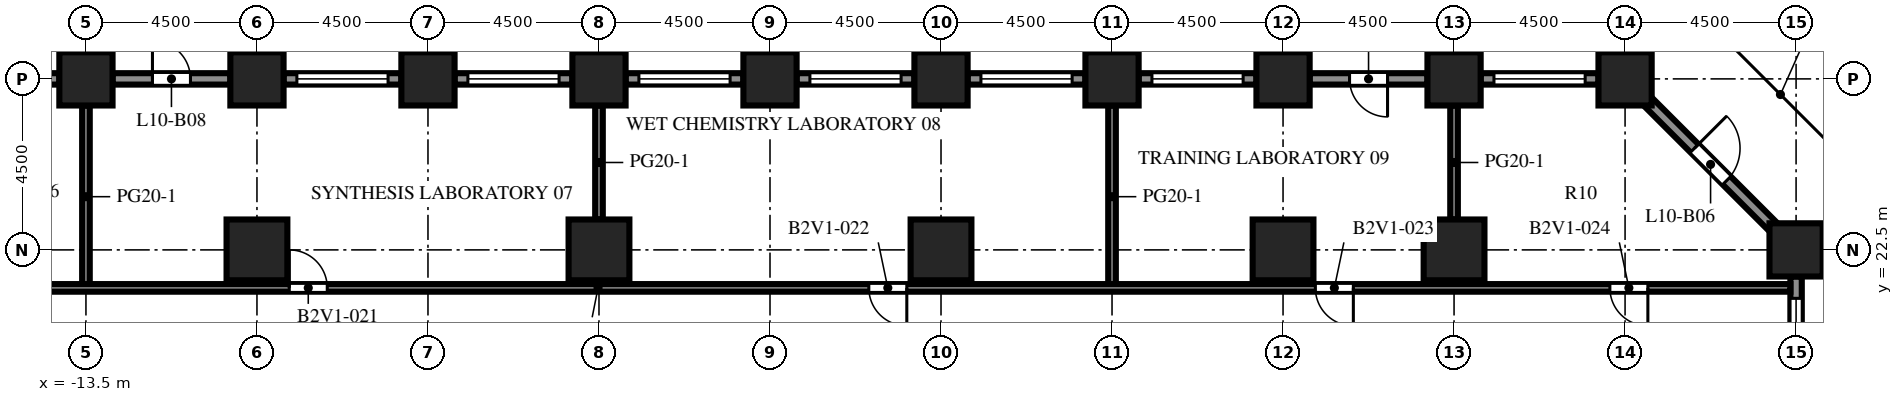
"""IFC4 building model, lengths in metres.
Left out: names, types, materials, properties, quantities, classifications, styles, units other than length and angle.
Written with IfcOpenShell. Run it as: python <this file> out.ifc"""

import sys

from ifc_helpers import new_model, si_unit, direction, frame, frame_2d, origin, origin_2d, place, context, subcontext, project, spatial, rectangle, extrude, element, fill, save


model = new_model("IFC4")
c1 = context("Model", 3, precision=1e-05, world=origin(), true_north=direction((0.0, 1.0)))
c2 = subcontext(c1, "Body", "Model", "MODEL_VIEW")
j1 = project(units=[si_unit("LENGTHUNIT", "METRE"), si_unit("PLANEANGLEUNIT", "RADIAN")], contexts=[c1])
p1 = place(None, origin())
s1 = spatial("IfcSite", under=j1, at=p1, CompositionType="ELEMENT")
p2 = place(p1, origin())
s2 = spatial("IfcBuilding", under=s1, at=p2, CompositionType="ELEMENT")
p3 = place(p2, frame((0.0, 0.0, 46.0)))
s3 = spatial("IfcBuildingStorey", under=s2, at=p3, CompositionType="ELEMENT", Elevation=46.0)
for number, where, z_axis, x_axis in (
    (1, (-13.5, 27.0, 0.0), (0.0, 0.0, 1.0), (1.0, 0.0, 0.0)),
    (2, (-9.0, 27.0, 0.0), (0.0, 0.0, 1.0), (1.0, 0.0, 0.0)),
    (3, (-4.5, 27.0, 0.0), (0.0, 0.0, 1.0), (1.0, 0.0, 0.0)),
    (4, (0.0, 27.0, 0.0), (0.0, 0.0, 1.0), (1.0, 0.0, 0.0)),
    (5, (4.5, 27.0, 0.0), (0.0, 0.0, 1.0), (1.0, 0.0, 0.0)),
    (6, (9.0, 27.0, 0.0), (0.0, 0.0, 1.0), (1.0, 0.0, 0.0)),
    (7, (13.5, 27.0, 0.0), (0.0, 0.0, 1.0), (1.0, 0.0, 0.0)),
    (8, (18.0, 27.0, 0.0), (0.0, 0.0, 1.0), (1.0, 0.0, 0.0)),
    (9, (22.5, 27.0, 0.0), (0.0, 0.0, 1.0), (1.0, 0.0, 0.0)),
    (10, (27.0, 27.0, 0.0), (0.0, 0.0, 1.0), (1.0, 0.0, 0.0)),
    (11, (31.5, 22.5, 0.0), (0.0, 0.0, 1.0), (1.0, 0.0, 0.0)),
):
    element("IfcColumn", number, at=place(p3, frame(where, z_axis=z_axis, x_axis=x_axis)), inside=s3, PredefinedType="COLUMN", context=c2, shape_type="SweptSolid", body=[
        extrude(rectangle(XDim=1.4, YDim=1.4, at=origin_2d()), origin(), (0.0, 0.0, 1.0), 4.1),
    ])
for number, where, z_axis, x_axis in (
    (12, (-9.0, 22.5, 0.0), (0.0, 0.0, 1.0), (1.0, 0.0, 0.0)),
    (13, (0.0, 22.5, 0.0), (0.0, 0.0, 1.0), (1.0, 0.0, 0.0)),
    (14, (9.0, 22.5, 0.0), (0.0, 0.0, 1.0), (1.0, 0.0, 0.0)),
    (15, (18.0, 22.5, 0.0), (0.0, 0.0, 1.0), (1.0, 0.0, 0.0)),
    (16, (22.5, 22.5, 0.0), (0.0, 0.0, 1.0), (1.0, 0.0, 0.0)),
):
    element("IfcColumn", number, at=place(p3, frame(where, z_axis=z_axis, x_axis=x_axis)), inside=s3, PredefinedType="COLUMN", context=c2, shape_type="SweptSolid", body=[
        extrude(rectangle(XDim=1.6, YDim=1.6, at=origin_2d()), origin(), (0.0, 0.0, 1.0), 4.1),
    ])
p4 = place(p3, frame((31.5, 21.8, 0.0), z_axis=(0.0, 0.0, 1.0), x_axis=(0.0, -1.0, 0.0)))
e17 = element("IfcWall", 17, at=p4, inside=s3, PredefinedType="SOLIDWALL", context=c2, shape_type="SweptSolid", body=[
    extrude(rectangle(XDim=3.1, YDim=0.3, at=frame_2d((1.55, 0.0))), origin(), (0.0, 0.0, 1.0), 2.75),
])
p5 = place(p4, frame((0.575, 0.0, 0.8)))
e18 = element("IfcOpeningElement", 18, at=p5, cuts=e17, PredefinedType="OPENING", context=c2, shape_type="SweptSolid", body=[
    extrude(rectangle(XDim=2.4, YDim=1.7, at=frame_2d((1.2, 0.85))), frame((0.0, 0.16, 0.0), z_axis=(0.0, -1.0, 0.0), x_axis=(1.0, 0.0, 0.0)), (0.0, 0.0, 1.0), 0.32),
])
p6 = place(p3, frame((27.594, 26.406, 0.0), z_axis=(0.0, 0.0, 1.0), x_axis=(0.707106781187, -0.707106781187, 0.0)))
e19 = element("IfcWall", 19, at=p6, inside=s3, PredefinedType="SOLIDWALL", context=c2, shape_type="SweptSolid", body=[
    extrude(rectangle(XDim=4.684, YDim=0.3, at=frame_2d((2.342, 0.0))), origin(), (0.0, 0.0, 1.0), 2.75),
])
p7 = place(p6, frame((1.742, 0.0, 0.0)))
e20 = element("IfcOpeningElement", 20, at=p7, cuts=e19, PredefinedType="OPENING", context=c2, shape_type="SweptSolid", body=[
    extrude(rectangle(XDim=1.2, YDim=2.2, at=frame_2d((0.6, 1.1))), frame((0.0, 0.16, 0.0), z_axis=(0.0, -1.0, 0.0), x_axis=(1.0, 0.0, 0.0)), (0.0, 0.0, 1.0), 0.32),
])
p8 = place(p3, frame((23.2, 27.0, 0.0), z_axis=(0.0, 0.0, 1.0), x_axis=(1.0, 0.0, 0.0)))
e21 = element("IfcWall", 21, at=p8, inside=s3, PredefinedType="SOLIDWALL", context=c2, shape_type="SweptSolid", body=[
    extrude(rectangle(XDim=3.1, YDim=0.3, at=frame_2d((1.55, 0.0))), origin(), (0.0, 0.0, 1.0), 2.75),
])
p9 = place(p8, frame((0.35, 0.0, 0.8)))
e22 = element("IfcOpeningElement", 22, at=p9, cuts=e21, PredefinedType="OPENING", context=c2, shape_type="SweptSolid", body=[
    extrude(rectangle(XDim=2.4, YDim=1.7, at=frame_2d((1.2, 0.85))), frame((0.0, 0.16, 0.0), z_axis=(0.0, -1.0, 0.0), x_axis=(1.0, 0.0, 0.0)), (0.0, 0.0, 1.0), 0.32),
])
p10 = place(p3, frame((18.7, 27.0, 0.0), z_axis=(0.0, 0.0, 1.0), x_axis=(1.0, 0.0, 0.0)))
e23 = element("IfcWall", 23, at=p10, inside=s3, PredefinedType="SOLIDWALL", context=c2, shape_type="SweptSolid", body=[
    extrude(rectangle(XDim=3.1, YDim=0.3, at=frame_2d((1.55, 0.0))), origin(), (0.0, 0.0, 1.0), 2.75),
])
p11 = place(p10, frame((1.05, 0.0, 0.0)))
e24 = element("IfcOpeningElement", 24, at=p11, cuts=e23, PredefinedType="OPENING", context=c2, shape_type="SweptSolid", body=[
    extrude(rectangle(XDim=1.0, YDim=2.2, at=frame_2d((0.5, 1.1))), frame((0.0, 0.16, 0.0), z_axis=(0.0, -1.0, 0.0), x_axis=(1.0, 0.0, 0.0)), (0.0, 0.0, 1.0), 0.32),
])
p12 = place(p3, frame((14.2, 27.0, 0.0), z_axis=(0.0, 0.0, 1.0), x_axis=(1.0, 0.0, 0.0)))
e25 = element("IfcWall", 25, at=p12, inside=s3, PredefinedType="SOLIDWALL", context=c2, shape_type="SweptSolid", body=[
    extrude(rectangle(XDim=3.1, YDim=0.3, at=frame_2d((1.55, 0.0))), origin(), (0.0, 0.0, 1.0), 2.75),
])
p13 = place(p12, frame((0.35, 0.0, 0.8)))
e26 = element("IfcOpeningElement", 26, at=p13, cuts=e25, PredefinedType="OPENING", context=c2, shape_type="SweptSolid", body=[
    extrude(rectangle(XDim=2.4, YDim=1.7, at=frame_2d((1.2, 0.85))), frame((0.0, 0.16, 0.0), z_axis=(0.0, -1.0, 0.0), x_axis=(1.0, 0.0, 0.0)), (0.0, 0.0, 1.0), 0.32),
])
p14 = place(p3, frame((9.7, 27.0, 0.0), z_axis=(0.0, 0.0, 1.0), x_axis=(1.0, 0.0, 0.0)))
e27 = element("IfcWall", 27, at=p14, inside=s3, PredefinedType="SOLIDWALL", context=c2, shape_type="SweptSolid", body=[
    extrude(rectangle(XDim=3.1, YDim=0.3, at=frame_2d((1.55, 0.0))), origin(), (0.0, 0.0, 1.0), 2.75),
])
p15 = place(p14, frame((0.35, 0.0, 0.8)))
e28 = element("IfcOpeningElement", 28, at=p15, cuts=e27, PredefinedType="OPENING", context=c2, shape_type="SweptSolid", body=[
    extrude(rectangle(XDim=2.4, YDim=1.7, at=frame_2d((1.2, 0.85))), frame((0.0, 0.16, 0.0), z_axis=(0.0, -1.0, 0.0), x_axis=(1.0, 0.0, 0.0)), (0.0, 0.0, 1.0), 0.32),
])
p16 = place(p3, frame((5.2, 27.0, 0.0), z_axis=(0.0, 0.0, 1.0), x_axis=(1.0, 0.0, 0.0)))
e29 = element("IfcWall", 29, at=p16, inside=s3, PredefinedType="SOLIDWALL", context=c2, shape_type="SweptSolid", body=[
    extrude(rectangle(XDim=3.1, YDim=0.3, at=frame_2d((1.55, 0.0))), origin(), (0.0, 0.0, 1.0), 2.75),
])
p17 = place(p16, frame((0.35, 0.0, 0.8)))
e30 = element("IfcOpeningElement", 30, at=p17, cuts=e29, PredefinedType="OPENING", context=c2, shape_type="SweptSolid", body=[
    extrude(rectangle(XDim=2.4, YDim=1.7, at=frame_2d((1.2, 0.85))), frame((0.0, 0.16, 0.0), z_axis=(0.0, -1.0, 0.0), x_axis=(1.0, 0.0, 0.0)), (0.0, 0.0, 1.0), 0.32),
])
p18 = place(p3, frame((0.7, 27.0, 0.0), z_axis=(0.0, 0.0, 1.0), x_axis=(1.0, 0.0, 0.0)))
e31 = element("IfcWall", 31, at=p18, inside=s3, PredefinedType="SOLIDWALL", context=c2, shape_type="SweptSolid", body=[
    extrude(rectangle(XDim=3.1, YDim=0.3, at=frame_2d((1.55, 0.0))), origin(), (0.0, 0.0, 1.0), 2.75),
])
p19 = place(p18, frame((0.35, 0.0, 0.8)))
e32 = element("IfcOpeningElement", 32, at=p19, cuts=e31, PredefinedType="OPENING", context=c2, shape_type="SweptSolid", body=[
    extrude(rectangle(XDim=2.4, YDim=1.7, at=frame_2d((1.2, 0.85))), frame((0.0, 0.16, 0.0), z_axis=(0.0, -1.0, 0.0), x_axis=(1.0, 0.0, 0.0)), (0.0, 0.0, 1.0), 0.32),
])
p20 = place(p3, frame((-3.8, 27.0, 0.0), z_axis=(0.0, 0.0, 1.0), x_axis=(1.0, 0.0, 0.0)))
e33 = element("IfcWall", 33, at=p20, inside=s3, PredefinedType="SOLIDWALL", context=c2, shape_type="SweptSolid", body=[
    extrude(rectangle(XDim=3.1, YDim=0.3, at=frame_2d((1.55, 0.0))), origin(), (0.0, 0.0, 1.0), 2.75),
])
p21 = place(p20, frame((0.35, 0.0, 0.8)))
e34 = element("IfcOpeningElement", 34, at=p21, cuts=e33, PredefinedType="OPENING", context=c2, shape_type="SweptSolid", body=[
    extrude(rectangle(XDim=2.4, YDim=1.7, at=frame_2d((1.2, 0.85))), frame((0.0, 0.16, 0.0), z_axis=(0.0, -1.0, 0.0), x_axis=(1.0, 0.0, 0.0)), (0.0, 0.0, 1.0), 0.32),
])
p22 = place(p3, frame((-8.3, 27.0, 0.0), z_axis=(0.0, 0.0, 1.0), x_axis=(1.0, 0.0, 0.0)))
e35 = element("IfcWall", 35, at=p22, inside=s3, PredefinedType="SOLIDWALL", context=c2, shape_type="SweptSolid", body=[
    extrude(rectangle(XDim=3.1, YDim=0.3, at=frame_2d((1.55, 0.0))), origin(), (0.0, 0.0, 1.0), 2.75),
])
p23 = place(p22, frame((0.35, 0.0, 0.8)))
e36 = element("IfcOpeningElement", 36, at=p23, cuts=e35, PredefinedType="OPENING", context=c2, shape_type="SweptSolid", body=[
    extrude(rectangle(XDim=2.4, YDim=1.7, at=frame_2d((1.2, 0.85))), frame((0.0, 0.16, 0.0), z_axis=(0.0, -1.0, 0.0), x_axis=(1.0, 0.0, 0.0)), (0.0, 0.0, 1.0), 0.32),
])
p24 = place(p3, frame((-12.8, 27.0, 0.0), z_axis=(0.0, 0.0, 1.0), x_axis=(1.0, 0.0, 0.0)))
e37 = element("IfcWall", 37, at=p24, inside=s3, PredefinedType="SOLIDWALL", context=c2, shape_type="SweptSolid", body=[
    extrude(rectangle(XDim=3.1, YDim=0.3, at=frame_2d((1.55, 0.0))), origin(), (0.0, 0.0, 1.0), 2.75),
])
p25 = place(p24, frame((1.05, 0.0, 0.0)))
e38 = element("IfcOpeningElement", 38, at=p25, cuts=e37, PredefinedType="OPENING", context=c2, shape_type="SweptSolid", body=[
    extrude(rectangle(XDim=1.0, YDim=2.2, at=frame_2d((0.5, 1.1))), frame((0.0, 0.16, 0.0), z_axis=(0.0, -1.0, 0.0), x_axis=(1.0, 0.0, 0.0)), (0.0, 0.0, 1.0), 0.32),
])
p26 = place(p3, frame((-17.3, 27.0, 0.0), z_axis=(0.0, 0.0, 1.0), x_axis=(1.0, 0.0, 0.0)))
e39 = element("IfcWall", 39, at=p26, inside=s3, PredefinedType="SOLIDWALL", context=c2, shape_type="SweptSolid", body=[
    extrude(rectangle(XDim=3.1, YDim=0.3, at=frame_2d((1.55, 0.0))), origin(), (0.0, 0.0, 1.0), 2.75),
])
p27 = place(p26, frame((0.35, 0.0, 0.8)))
e40 = element("IfcOpeningElement", 40, at=p27, cuts=e39, PredefinedType="OPENING", context=c2, shape_type="SweptSolid", body=[
    extrude(rectangle(XDim=2.4, YDim=1.7, at=frame_2d((1.2, 0.85))), frame((0.0, 0.16, 0.0), z_axis=(0.0, -1.0, 0.0), x_axis=(1.0, 0.0, 0.0)), (0.0, 0.0, 1.0), 0.32),
])
p28 = place(p3, frame((-13.5, 21.5, 0.0), z_axis=(0.0, 0.0, 1.0), x_axis=(0.0, 1.0, 0.0)))
e41 = element("IfcWall", 41, at=p28, inside=s3, PredefinedType="PARTITIONING", context=c2, shape_type="SweptSolid", body=[
    extrude(rectangle(XDim=4.8, YDim=0.2, at=frame_2d((2.4, 0.0))), origin(), (0.0, 0.0, 1.0), 3.65),
])
p29 = place(p3, frame((0.0, 23.3, 0.0), z_axis=(0.0, 0.0, 1.0), x_axis=(0.0, 1.0, 0.0)))
e42 = element("IfcWall", 42, at=p29, inside=s3, PredefinedType="PARTITIONING", context=c2, shape_type="SweptSolid", body=[
    extrude(rectangle(XDim=3.0, YDim=0.2, at=frame_2d((1.5, 0.0))), origin(), (0.0, 0.0, 1.0), 3.65),
])
p30 = place(p3, frame((13.5, 21.5, 0.0), z_axis=(0.0, 0.0, 1.0), x_axis=(0.0, 1.0, 0.0)))
e43 = element("IfcWall", 43, at=p30, inside=s3, PredefinedType="PARTITIONING", context=c2, shape_type="SweptSolid", body=[
    extrude(rectangle(XDim=4.8, YDim=0.2, at=frame_2d((2.4, 0.0))), origin(), (0.0, 0.0, 1.0), 3.65),
])
p31 = place(p3, frame((22.5, 23.3, 0.0), z_axis=(0.0, 0.0, 1.0), x_axis=(0.0, 1.0, 0.0)))
e44 = element("IfcWall", 44, at=p31, inside=s3, PredefinedType="PARTITIONING", context=c2, shape_type="SweptSolid", body=[
    extrude(rectangle(XDim=3.0, YDim=0.2, at=frame_2d((1.5, 0.0))), origin(), (0.0, 0.0, 1.0), 3.65),
])
p32 = place(p3, frame((-22.35, 21.5, 0.0), z_axis=(0.0, 0.0, 1.0), x_axis=(1.0, 0.0, 0.0)))
e45 = element("IfcWall", 45, at=p32, inside=s3, PredefinedType="PARTITIONING", context=c2, shape_type="SweptSolid", body=[
    extrude(rectangle(XDim=53.7, YDim=0.2, at=frame_2d((26.85, 0.0))), origin(), (0.0, 0.0, 1.0), 3.65),
])
p33 = place(p32, frame((3.7, 0.0, 0.0)))
e46 = element("IfcOpeningElement", 46, at=p33, cuts=e45, PredefinedType="OPENING", context=c2, shape_type="SweptSolid", body=[
    extrude(rectangle(XDim=1.0, YDim=2.1, at=frame_2d((0.5, 1.05))), frame((0.0, 0.11, 0.0), z_axis=(0.0, -1.0, 0.0), x_axis=(1.0, 0.0, 0.0)), (0.0, 0.0, 1.0), 0.22),
])
p34 = place(p32, frame((14.2, 0.0, 0.0)))
e47 = element("IfcOpeningElement", 47, at=p34, cuts=e45, PredefinedType="OPENING", context=c2, shape_type="SweptSolid", body=[
    extrude(rectangle(XDim=1.0, YDim=2.1, at=frame_2d((0.5, 1.05))), frame((0.0, 0.11, 0.0), z_axis=(0.0, -1.0, 0.0), x_axis=(1.0, 0.0, 0.0)), (0.0, 0.0, 1.0), 0.22),
])
p35 = place(p32, frame((29.45, 0.0, 0.0)))
e48 = element("IfcOpeningElement", 48, at=p35, cuts=e45, PredefinedType="OPENING", context=c2, shape_type="SweptSolid", body=[
    extrude(rectangle(XDim=1.0, YDim=2.1, at=frame_2d((0.5, 1.05))), frame((0.0, 0.11, 0.0), z_axis=(0.0, -1.0, 0.0), x_axis=(1.0, 0.0, 0.0)), (0.0, 0.0, 1.0), 0.22),
])
p36 = place(p32, frame((41.2, 0.0, 0.0)))
e49 = element("IfcOpeningElement", 49, at=p36, cuts=e45, PredefinedType="OPENING", context=c2, shape_type="SweptSolid", body=[
    extrude(rectangle(XDim=1.0, YDim=2.1, at=frame_2d((0.5, 1.05))), frame((0.0, 0.11, 0.0), z_axis=(0.0, -1.0, 0.0), x_axis=(1.0, 0.0, 0.0)), (0.0, 0.0, 1.0), 0.22),
])
p37 = place(p32, frame((48.95, 0.0, 0.0)))
e50 = element("IfcOpeningElement", 50, at=p37, cuts=e45, PredefinedType="OPENING", context=c2, shape_type="SweptSolid", body=[
    extrude(rectangle(XDim=1.0, YDim=2.1, at=frame_2d((0.5, 1.05))), frame((0.0, 0.11, 0.0), z_axis=(0.0, -1.0, 0.0), x_axis=(1.0, 0.0, 0.0)), (0.0, 0.0, 1.0), 0.22),
])
p38 = place(p5, origin())
e51 = element("IfcWindow", 51, at=p38, inside=s3, PartitioningType="SINGLE_PANEL", PredefinedType="WINDOW", context=c2, shape_type="SweptSolid", body=[
    extrude(rectangle(XDim=2.4, YDim=1.7, at=frame_2d((1.2, 0.85))), frame((0.0, 0.03, 0.0), z_axis=(0.0, -1.0, 0.0), x_axis=(1.0, 0.0, 0.0)), (0.0, 0.0, 1.0), 0.06),
])
fill(e18, e51)
p39 = place(p7, origin())
e52 = element("IfcDoor", 52, at=p39, inside=s3, OperationType="SINGLE_SWING_LEFT", PredefinedType="DOOR", context=c2, shape_type="SweptSolid", body=[
    extrude(rectangle(XDim=1.2, YDim=2.2, at=frame_2d((0.6, 1.1))), frame((0.0, 0.025, 0.0), z_axis=(0.0, -1.0, 0.0), x_axis=(1.0, 0.0, 0.0)), (0.0, 0.0, 1.0), 0.05),
])
fill(e20, e52)
p40 = place(p9, origin())
e53 = element("IfcWindow", 53, at=p40, inside=s3, PartitioningType="SINGLE_PANEL", PredefinedType="WINDOW", context=c2, shape_type="SweptSolid", body=[
    extrude(rectangle(XDim=2.4, YDim=1.7, at=frame_2d((1.2, 0.85))), frame((0.0, 0.03, 0.0), z_axis=(0.0, -1.0, 0.0), x_axis=(1.0, 0.0, 0.0)), (0.0, 0.0, 1.0), 0.06),
])
fill(e22, e53)
p41 = place(p11, origin())
e54 = element("IfcDoor", 54, at=p41, inside=s3, OperationType="SINGLE_SWING_RIGHT", PredefinedType="DOOR", context=c2, shape_type="SweptSolid", body=[
    extrude(rectangle(XDim=1.0, YDim=2.2, at=frame_2d((0.5, 1.1))), frame((0.0, 0.025, 0.0), z_axis=(0.0, -1.0, 0.0), x_axis=(1.0, 0.0, 0.0)), (0.0, 0.0, 1.0), 0.05),
])
fill(e24, e54)
p42 = place(p13, origin())
e55 = element("IfcWindow", 55, at=p42, inside=s3, PartitioningType="SINGLE_PANEL", PredefinedType="WINDOW", context=c2, shape_type="SweptSolid", body=[
    extrude(rectangle(XDim=2.4, YDim=1.7, at=frame_2d((1.2, 0.85))), frame((0.0, 0.03, 0.0), z_axis=(0.0, -1.0, 0.0), x_axis=(1.0, 0.0, 0.0)), (0.0, 0.0, 1.0), 0.06),
])
fill(e26, e55)
p43 = place(p15, origin())
e56 = element("IfcWindow", 56, at=p43, inside=s3, PartitioningType="SINGLE_PANEL", PredefinedType="WINDOW", context=c2, shape_type="SweptSolid", body=[
    extrude(rectangle(XDim=2.4, YDim=1.7, at=frame_2d((1.2, 0.85))), frame((0.0, 0.03, 0.0), z_axis=(0.0, -1.0, 0.0), x_axis=(1.0, 0.0, 0.0)), (0.0, 0.0, 1.0), 0.06),
])
fill(e28, e56)
p44 = place(p17, origin())
e57 = element("IfcWindow", 57, at=p44, inside=s3, PartitioningType="SINGLE_PANEL", PredefinedType="WINDOW", context=c2, shape_type="SweptSolid", body=[
    extrude(rectangle(XDim=2.4, YDim=1.7, at=frame_2d((1.2, 0.85))), frame((0.0, 0.03, 0.0), z_axis=(0.0, -1.0, 0.0), x_axis=(1.0, 0.0, 0.0)), (0.0, 0.0, 1.0), 0.06),
])
fill(e30, e57)
p45 = place(p19, origin())
e58 = element("IfcWindow", 58, at=p45, inside=s3, PartitioningType="SINGLE_PANEL", PredefinedType="WINDOW", context=c2, shape_type="SweptSolid", body=[
    extrude(rectangle(XDim=2.4, YDim=1.7, at=frame_2d((1.2, 0.85))), frame((0.0, 0.03, 0.0), z_axis=(0.0, -1.0, 0.0), x_axis=(1.0, 0.0, 0.0)), (0.0, 0.0, 1.0), 0.06),
])
fill(e32, e58)
p46 = place(p21, origin())
e59 = element("IfcWindow", 59, at=p46, inside=s3, PartitioningType="SINGLE_PANEL", PredefinedType="WINDOW", context=c2, shape_type="SweptSolid", body=[
    extrude(rectangle(XDim=2.4, YDim=1.7, at=frame_2d((1.2, 0.85))), frame((0.0, 0.03, 0.0), z_axis=(0.0, -1.0, 0.0), x_axis=(1.0, 0.0, 0.0)), (0.0, 0.0, 1.0), 0.06),
])
fill(e34, e59)
p47 = place(p23, origin())
e60 = element("IfcWindow", 60, at=p47, inside=s3, PartitioningType="SINGLE_PANEL", PredefinedType="WINDOW", context=c2, shape_type="SweptSolid", body=[
    extrude(rectangle(XDim=2.4, YDim=1.7, at=frame_2d((1.2, 0.85))), frame((0.0, 0.03, 0.0), z_axis=(0.0, -1.0, 0.0), x_axis=(1.0, 0.0, 0.0)), (0.0, 0.0, 1.0), 0.06),
])
fill(e36, e60)
p48 = place(p25, origin())
e61 = element("IfcDoor", 61, at=p48, inside=s3, OperationType="SINGLE_SWING_LEFT", PredefinedType="DOOR", context=c2, shape_type="SweptSolid", body=[
    extrude(rectangle(XDim=1.0, YDim=2.2, at=frame_2d((0.5, 1.1))), frame((0.0, 0.025, 0.0), z_axis=(0.0, -1.0, 0.0), x_axis=(1.0, 0.0, 0.0)), (0.0, 0.0, 1.0), 0.05),
])
fill(e38, e61)
p49 = place(p34, origin())
e62 = element("IfcDoor", 62, at=p49, inside=s3, OperationType="SINGLE_SWING_LEFT", PredefinedType="DOOR", context=c2, shape_type="SweptSolid", body=[
    extrude(rectangle(XDim=1.0, YDim=2.1, at=frame_2d((0.5, 1.05))), frame((0.0, 0.025, 0.0), z_axis=(0.0, -1.0, 0.0), x_axis=(1.0, 0.0, 0.0)), (0.0, 0.0, 1.0), 0.05),
])
fill(e47, e62)
p50 = place(p35, origin())
e63 = element("IfcDoor", 63, at=p50, inside=s3, OperationType="SINGLE_SWING_RIGHT", PredefinedType="DOOR", context=c2, shape_type="SweptSolid", body=[
    extrude(rectangle(XDim=1.0, YDim=2.1, at=frame_2d((0.5, 1.05))), frame((0.0, 0.025, 0.0), z_axis=(0.0, -1.0, 0.0), x_axis=(1.0, 0.0, 0.0)), (0.0, 0.0, 1.0), 0.05),
])
fill(e48, e63)
p51 = place(p36, origin())
e64 = element("IfcDoor", 64, at=p51, inside=s3, OperationType="SINGLE_SWING_RIGHT", PredefinedType="DOOR", context=c2, shape_type="SweptSolid", body=[
    extrude(rectangle(XDim=1.0, YDim=2.1, at=frame_2d((0.5, 1.05))), frame((0.0, 0.025, 0.0), z_axis=(0.0, -1.0, 0.0), x_axis=(1.0, 0.0, 0.0)), (0.0, 0.0, 1.0), 0.05),
])
fill(e49, e64)
p52 = place(p37, origin())
e65 = element("IfcDoor", 65, at=p52, inside=s3, OperationType="SINGLE_SWING_RIGHT", PredefinedType="DOOR", context=c2, shape_type="SweptSolid", body=[
    extrude(rectangle(XDim=1.0, YDim=2.1, at=frame_2d((0.5, 1.05))), frame((0.0, 0.025, 0.0), z_axis=(0.0, -1.0, 0.0), x_axis=(1.0, 0.0, 0.0)), (0.0, 0.0, 1.0), 0.05),
])
fill(e50, e65)
save(model, sys.argv[1])
